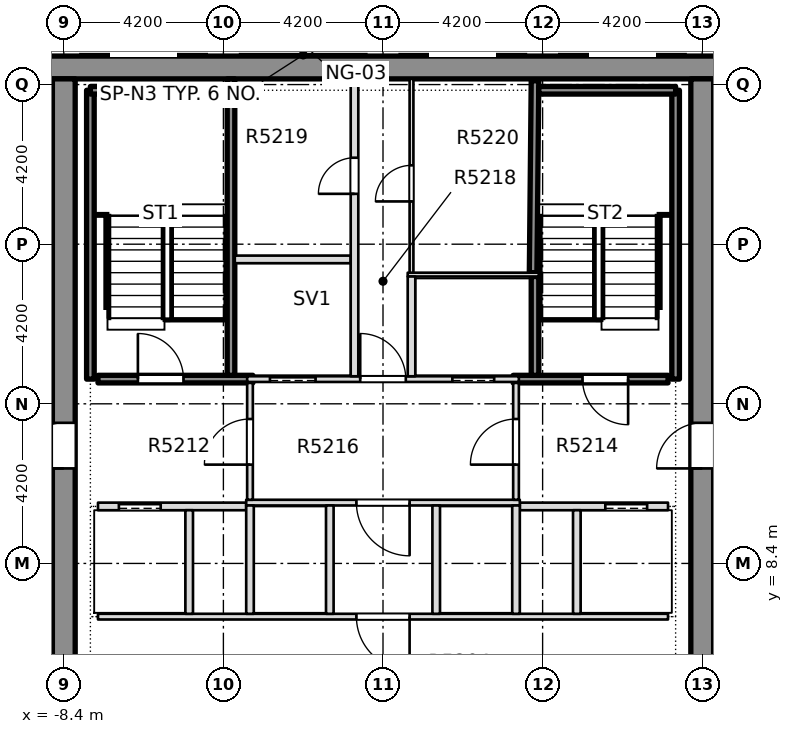
"""IFC4 building model, lengths in metres.
Left out: names, types, materials, properties, quantities, classifications, styles, units other than length and angle.
Written with IfcOpenShell. Run it as: python <this file> out.ifc"""

import sys

from ifc_helpers import new_model, si_unit, direction, frame, frame_2d, origin, place, context, subcontext, project, spatial, rectangle, extrude, element, fill, save


model = new_model("IFC4")
c1 = context("Model", 3, precision=1e-05, world=origin(), true_north=direction((0.0, 1.0)))
c2 = subcontext(c1, "Body", "Model", "MODEL_VIEW")
j1 = project(units=[si_unit("LENGTHUNIT", "METRE"), si_unit("PLANEANGLEUNIT", "RADIAN")], contexts=[c1])
p1 = place(None, origin())
s1 = spatial("IfcSite", under=j1, at=p1, CompositionType="ELEMENT")
p2 = place(p1, origin())
s2 = spatial("IfcBuilding", under=s1, at=p2, CompositionType="ELEMENT")
p3 = place(p2, frame((0.0, 0.0, 199.7)))
s3 = spatial("IfcBuildingStorey", under=s2, at=p3, CompositionType="ELEMENT", Elevation=199.7)
p4 = place(p3, frame((-12.0, 21.45, -0.4), z_axis=(0.0, 0.0, 1.0), x_axis=(1.0, 0.0, 0.0)))
e1 = element("IfcWall", 1, at=p4, inside=s3, PredefinedType="SHEAR", context=c2, shape_type="SweptSolid", body=[
    extrude(rectangle(XDim=24.0, YDim=0.6, at=frame_2d((12.0, 0.0))), origin(), (0.0, 0.0, 1.0), 3.45),
])
p5 = place(p3, frame((-8.4, -7.8, -0.4), z_axis=(0.0, 0.0, 1.0), x_axis=(0.0, 1.0, 0.0)))
e2 = element("IfcWall", 2, at=p5, inside=s3, PredefinedType="SHEAR", context=c2, shape_type="SweptSolid", body=[
    extrude(rectangle(XDim=28.95, YDim=0.6, at=frame_2d((14.475, 0.0))), origin(), (0.0, 0.0, 1.0), 3.45),
])
p6 = place(p5, frame((18.7, 0.0, 0.4)))
e3 = element("IfcOpeningElement", 3, at=p6, cuts=e2, PredefinedType="OPENING", context=c2, shape_type="SweptSolid", body=[
    extrude(rectangle(XDim=1.2, YDim=2.1, at=frame_2d((0.6, 1.05))), frame((0.0, 0.31, 0.0), z_axis=(0.0, -1.0, 0.0), x_axis=(1.0, 0.0, 0.0)), (0.0, 0.0, 1.0), 0.62),
])
p7 = place(p3, frame((8.4, -7.8, -0.4), z_axis=(0.0, 0.0, 1.0), x_axis=(0.0, 1.0, 0.0)))
e4 = element("IfcWall", 4, at=p7, inside=s3, PredefinedType="SHEAR", context=c2, shape_type="SweptSolid", body=[
    extrude(rectangle(XDim=28.95, YDim=0.6, at=frame_2d((14.475, 0.0))), origin(), (0.0, 0.0, 1.0), 3.45),
])
p8 = place(p7, frame((18.7, 0.0, 0.4)))
e5 = element("IfcOpeningElement", 5, at=p8, cuts=e4, PredefinedType="OPENING", context=c2, shape_type="SweptSolid", body=[
    extrude(rectangle(XDim=1.2, YDim=2.1, at=frame_2d((0.6, 1.05))), frame((0.0, 0.31, 0.0), z_axis=(0.0, -1.0, 0.0), x_axis=(1.0, 0.0, 0.0)), (0.0, 0.0, 1.0), 0.62),
])
p9 = place(p3, frame((-7.5, 7.0, 0.0), z_axis=(0.0, 0.0, 1.0), x_axis=(1.0, 0.0, 0.0)))
e6 = element("IfcWall", 6, at=p9, inside=s3, PredefinedType="PARTITIONING", context=c2, shape_type="SweptSolid", body=[
    extrude(rectangle(XDim=15.0, YDim=0.15, at=frame_2d((7.5, 0.0))), origin(), (0.0, 0.0, 1.0), 3.05),
])
p10 = place(p9, frame((6.8, 0.0, 0.0)))
e7 = element("IfcOpeningElement", 7, at=p10, cuts=e6, PredefinedType="OPENING", context=c2, shape_type="SweptSolid", body=[
    extrude(rectangle(XDim=1.4, YDim=2.1, at=frame_2d((0.7, 1.05))), frame((0.0, 0.085, 0.0), z_axis=(0.0, -1.0, 0.0), x_axis=(1.0, 0.0, 0.0)), (0.0, 0.0, 1.0), 0.17),
])
p11 = place(p3, frame((-7.5, 9.9, 0.0), z_axis=(0.0, 0.0, 1.0), x_axis=(1.0, 0.0, 0.0)))
e8 = element("IfcWall", 8, at=p11, inside=s3, PredefinedType="PARTITIONING", context=c2, shape_type="SweptSolid", body=[
    extrude(rectangle(XDim=3.9, YDim=0.2, at=frame_2d((1.95, 0.0))), origin(), (0.0, 0.0, 1.0), 3.05),
])
p12 = place(p11, frame((0.55, 0.0, 0.0)))
e9 = element("IfcOpeningElement", 9, at=p12, cuts=e8, PredefinedType="OPENING", context=c2, shape_type="SweptSolid", body=[
    extrude(rectangle(XDim=1.1, YDim=2.1, at=frame_2d((0.55, 1.05))), frame((0.0, 0.11, 0.0), z_axis=(0.0, -1.0, 0.0), x_axis=(1.0, 0.0, 0.0)), (0.0, 0.0, 1.0), 0.22),
])
p13 = place(p3, frame((3.6, 9.9, 0.0), z_axis=(0.0, 0.0, 1.0), x_axis=(1.0, 0.0, 0.0)))
e10 = element("IfcWall", 10, at=p13, inside=s3, PredefinedType="PARTITIONING", context=c2, shape_type="SweptSolid", body=[
    extrude(rectangle(XDim=3.9, YDim=0.2, at=frame_2d((1.95, 0.0))), origin(), (0.0, 0.0, 1.0), 3.05),
])
p14 = place(p13, frame((2.25, 0.0, 0.0)))
e11 = element("IfcOpeningElement", 11, at=p14, cuts=e10, PredefinedType="OPENING", context=c2, shape_type="SweptSolid", body=[
    extrude(rectangle(XDim=1.1, YDim=2.1, at=frame_2d((0.55, 1.05))), frame((0.0, 0.11, 0.0), z_axis=(0.0, -1.0, 0.0), x_axis=(1.0, 0.0, 0.0)), (0.0, 0.0, 1.0), 0.22),
])
p15 = place(p3, frame((-3.6, 10.0, 0.0), z_axis=(0.0, 0.0, 1.0), x_axis=(1.0, 0.0, 0.0)))
e12 = element("IfcWall", 12, at=p15, inside=s3, PredefinedType="PARTITIONING", context=c2, shape_type="SweptSolid", body=[
    extrude(rectangle(XDim=7.2, YDim=0.15, at=frame_2d((3.6, 0.0))), origin(), (0.0, 0.0, 1.0), 3.05),
])
p16 = place(p15, frame((2.9, 0.0, 0.0)))
e13 = element("IfcOpeningElement", 13, at=p16, cuts=e12, PredefinedType="OPENING", context=c2, shape_type="SweptSolid", body=[
    extrude(rectangle(XDim=1.4, YDim=2.1, at=frame_2d((0.7, 1.05))), frame((0.0, 0.085, 0.0), z_axis=(0.0, -1.0, 0.0), x_axis=(1.0, 0.0, 0.0)), (0.0, 0.0, 1.0), 0.17),
])
p17 = place(p3, frame((-7.5, 13.25, 0.0), z_axis=(0.0, 0.0, 1.0), x_axis=(1.0, 0.0, 0.0)))
e14 = element("IfcWall", 14, at=p17, inside=s3, PredefinedType="SOLIDWALL", context=c2, shape_type="SweptSolid", body=[
    extrude(rectangle(XDim=4.075, YDim=0.2, at=frame_2d((2.038, 0.0))), origin(), (0.0, 0.0, 1.0), 3.05),
])
p18 = place(p17, frame((1.05, 0.0, 0.0)))
e15 = element("IfcOpeningElement", 15, at=p18, cuts=e14, PredefinedType="OPENING", context=c2, shape_type="SweptSolid", body=[
    extrude(rectangle(XDim=1.2, YDim=2.1, at=frame_2d((0.6, 1.05))), frame((0.0, 0.11, 0.0), z_axis=(0.0, -1.0, 0.0), x_axis=(1.0, 0.0, 0.0)), (0.0, 0.0, 1.0), 0.22),
])
p19 = place(p3, frame((-3.575, 13.25, 0.0), z_axis=(0.0, 0.0, 1.0), x_axis=(1.0, 0.0, 0.0)))
e16 = element("IfcWall", 16, at=p19, inside=s3, PredefinedType="PARTITIONING", context=c2, shape_type="SweptSolid", body=[
    extrude(rectangle(XDim=7.15, YDim=0.15, at=frame_2d((3.575, 0.0))), origin(), (0.0, 0.0, 1.0), 3.05),
])
p20 = place(p19, frame((0.6, 0.0, 0.0)))
e17 = element("IfcOpeningElement", 17, at=p20, cuts=e16, PredefinedType="OPENING", context=c2, shape_type="SweptSolid", body=[
    extrude(rectangle(XDim=1.2, YDim=2.1, at=frame_2d((0.6, 1.05))), frame((0.0, 0.085, 0.0), z_axis=(0.0, -1.0, 0.0), x_axis=(1.0, 0.0, 0.0)), (0.0, 0.0, 1.0), 0.17),
])
p21 = place(p19, frame((5.4, 0.0, 0.0)))
e18 = element("IfcOpeningElement", 18, at=p21, cuts=e16, PredefinedType="OPENING", context=c2, shape_type="SweptSolid", body=[
    extrude(rectangle(XDim=1.1, YDim=2.1, at=frame_2d((0.55, 1.05))), frame((0.0, 0.085, 0.0), z_axis=(0.0, -1.0, 0.0), x_axis=(1.0, 0.0, 0.0)), (0.0, 0.0, 1.0), 0.17),
])
p22 = place(p19, frame((2.975, 0.0, 0.0)))
e19 = element("IfcOpeningElement", 19, at=p22, cuts=e16, PredefinedType="OPENING", context=c2, shape_type="SweptSolid", body=[
    extrude(rectangle(XDim=1.2, YDim=2.1, at=frame_2d((0.6, 1.05))), frame((0.0, 0.085, 0.0), z_axis=(0.0, -1.0, 0.0), x_axis=(1.0, 0.0, 0.0)), (0.0, 0.0, 1.0), 0.17),
])
p23 = place(p3, frame((3.425, 13.25, 0.0), z_axis=(0.0, 0.0, 1.0), x_axis=(1.0, 0.0, 0.0)))
e20 = element("IfcWall", 20, at=p23, inside=s3, PredefinedType="SOLIDWALL", context=c2, shape_type="SweptSolid", body=[
    extrude(rectangle(XDim=4.075, YDim=0.2, at=frame_2d((2.038, 0.0))), origin(), (0.0, 0.0, 1.0), 3.05),
])
p24 = place(p23, frame((1.825, 0.0, 0.0)))
e21 = element("IfcOpeningElement", 21, at=p24, cuts=e20, PredefinedType="OPENING", context=c2, shape_type="SweptSolid", body=[
    extrude(rectangle(XDim=1.2, YDim=2.1, at=frame_2d((0.6, 1.05))), frame((0.0, 0.11, 0.0), z_axis=(0.0, -1.0, 0.0), x_axis=(1.0, 0.0, 0.0)), (0.0, 0.0, 1.0), 0.22),
])
p25 = place(p3, frame((0.65, 16.0, 0.0), z_axis=(0.0, 0.0, 1.0), x_axis=(1.0, 0.0, 0.0)))
e22 = element("IfcWall", 22, at=p25, inside=s3, PredefinedType="PARTITIONING", context=c2, shape_type="SweptSolid", body=[
    extrude(rectangle(XDim=3.45, YDim=0.1, at=frame_2d((1.725, 0.0))), origin(), (0.0, 0.0, 1.0), 3.05),
])
p26 = place(p3, frame((-3.9, 16.4, 0.0), z_axis=(0.0, 0.0, 1.0), x_axis=(1.0, 0.0, 0.0)))
e23 = element("IfcWall", 23, at=p26, inside=s3, PredefinedType="PARTITIONING", context=c2, shape_type="SweptSolid", body=[
    extrude(rectangle(XDim=3.05, YDim=0.2, at=frame_2d((1.525, 0.0))), origin(), (0.0, 0.0, 1.0), 3.05),
])
p27 = place(p3, frame((-5.1, 7.075, 0.0), z_axis=(0.0, 0.0, 1.0), x_axis=(0.0, 1.0, 0.0)))
e24 = element("IfcWall", 24, at=p27, inside=s3, PredefinedType="PARTITIONING", context=c2, shape_type="SweptSolid", body=[
    extrude(rectangle(XDim=2.725, YDim=0.2, at=frame_2d((1.363, 0.0))), origin(), (0.0, 0.0, 1.0), 3.05),
])
p28 = place(p3, frame((-4.0, 13.35, 0.0), z_axis=(0.0, 0.0, 1.0), x_axis=(0.0, 1.0, 0.0)))
e25 = element("IfcWall", 25, at=p28, inside=s3, PredefinedType="SOLIDWALL", context=c2, shape_type="SweptSolid", body=[
    extrude(rectangle(XDim=7.799, YDim=0.2, at=frame_2d((3.899, 0.0))), origin(), (0.0, 0.0, 1.0), 3.05),
])
p29 = place(p3, frame((-3.5, 7.075, 0.0), z_axis=(0.0, 0.0, 1.0), x_axis=(0.0, 1.0, 0.0)))
e26 = element("IfcWall", 26, at=p29, inside=s3, PredefinedType="PARTITIONING", context=c2, shape_type="SweptSolid", body=[
    extrude(rectangle(XDim=2.85, YDim=0.2, at=frame_2d((1.425, 0.0))), origin(), (0.0, 0.0, 1.0), 3.05),
])
p30 = place(p3, frame((-3.5, 10.075, 0.0), z_axis=(0.0, 0.0, 1.0), x_axis=(0.0, 1.0, 0.0)))
e27 = element("IfcWall", 27, at=p30, inside=s3, PredefinedType="PARTITIONING", context=c2, shape_type="SweptSolid", body=[
    extrude(rectangle(XDim=3.075, YDim=0.15, at=frame_2d((1.538, 0.0))), origin(), (0.0, 0.0, 1.0), 3.05),
])
p31 = place(p30, frame((0.925, 0.0, 0.0)))
e28 = element("IfcOpeningElement", 28, at=p31, cuts=e27, PredefinedType="OPENING", context=c2, shape_type="SweptSolid", body=[
    extrude(rectangle(XDim=1.2, YDim=2.1, at=frame_2d((0.6, 1.05))), frame((0.0, 0.085, 0.0), z_axis=(0.0, -1.0, 0.0), x_axis=(1.0, 0.0, 0.0)), (0.0, 0.0, 1.0), 0.17),
])
p32 = place(p3, frame((-1.4, 7.075, 0.0), z_axis=(0.0, 0.0, 1.0), x_axis=(0.0, 1.0, 0.0)))
e29 = element("IfcWall", 29, at=p32, inside=s3, PredefinedType="PARTITIONING", context=c2, shape_type="SweptSolid", body=[
    extrude(rectangle(XDim=2.85, YDim=0.2, at=frame_2d((1.425, 0.0))), origin(), (0.0, 0.0, 1.0), 3.05),
])
p33 = place(p3, frame((-0.75, 13.325, 0.0), z_axis=(0.0, 0.0, 1.0), x_axis=(0.0, 1.0, 0.0)))
e30 = element("IfcWall", 30, at=p33, inside=s3, PredefinedType="PARTITIONING", context=c2, shape_type="SweptSolid", body=[
    extrude(rectangle(XDim=7.824, YDim=0.2, at=frame_2d((3.912, 0.0))), origin(), (0.0, 0.0, 1.0), 3.05),
])
p34 = place(p33, frame((4.8, 0.0, 0.0)))
e31 = element("IfcOpeningElement", 31, at=p34, cuts=e30, PredefinedType="OPENING", context=c2, shape_type="SweptSolid", body=[
    extrude(rectangle(XDim=0.95, YDim=2.1, at=frame_2d((0.475, 1.05))), frame((0.0, 0.11, 0.0), z_axis=(0.0, -1.0, 0.0), x_axis=(1.0, 0.0, 0.0)), (0.0, 0.0, 1.0), 0.22),
])
p35 = place(p3, frame((0.75, 13.325, 0.0), z_axis=(0.0, 0.0, 1.0), x_axis=(0.0, 1.0, 0.0)))
e32 = element("IfcWall", 32, at=p35, inside=s3, PredefinedType="PARTITIONING", context=c2, shape_type="SweptSolid", body=[
    extrude(rectangle(XDim=2.625, YDim=0.2, at=frame_2d((1.312, 0.0))), origin(), (0.0, 0.0, 1.0), 3.05),
])
p36 = place(p3, frame((0.75, 16.05, 0.0), z_axis=(0.0, 0.0, 1.0), x_axis=(0.0, 1.0, 0.0)))
e33 = element("IfcWall", 33, at=p36, inside=s3, PredefinedType="PARTITIONING", context=c2, shape_type="SweptSolid", body=[
    extrude(rectangle(XDim=5.099, YDim=0.1, at=frame_2d((2.549, 0.0))), origin(), (0.0, 0.0, 1.0), 3.05),
])
p37 = place(p36, frame((1.875, 0.0, 0.0)))
e34 = element("IfcOpeningElement", 34, at=p37, cuts=e33, PredefinedType="OPENING", context=c2, shape_type="SweptSolid", body=[
    extrude(rectangle(XDim=0.95, YDim=2.1, at=frame_2d((0.475, 1.05))), frame((0.0, 0.06, 0.0), z_axis=(0.0, -1.0, 0.0), x_axis=(1.0, 0.0, 0.0)), (0.0, 0.0, 1.0), 0.12),
])
for number, where, z_axis, x_axis in (
    (35, (1.4, 7.075, 0.0), (0.0, 0.0, 1.0), (0.0, 1.0, 0.0)),
    (36, (3.5, 7.075, 0.0), (0.0, 0.0, 1.0), (0.0, 1.0, 0.0)),
):
    element("IfcWall", number, at=place(p3, frame(where, z_axis=z_axis, x_axis=x_axis)), inside=s3, PredefinedType="PARTITIONING", context=c2, shape_type="SweptSolid", body=[
        extrude(rectangle(XDim=2.85, YDim=0.2, at=frame_2d((1.425, 0.0))), origin(), (0.0, 0.0, 1.0), 3.05),
    ])
p38 = place(p3, frame((3.5, 10.075, 0.0), z_axis=(0.0, 0.0, 1.0), x_axis=(0.0, 1.0, 0.0)))
e37 = element("IfcWall", 37, at=p38, inside=s3, PredefinedType="PARTITIONING", context=c2, shape_type="SweptSolid", body=[
    extrude(rectangle(XDim=3.075, YDim=0.15, at=frame_2d((1.538, 0.0))), origin(), (0.0, 0.0, 1.0), 3.05),
])
p39 = place(p38, frame((0.925, 0.0, 0.0)))
e38 = element("IfcOpeningElement", 38, at=p39, cuts=e37, PredefinedType="OPENING", context=c2, shape_type="SweptSolid", body=[
    extrude(rectangle(XDim=1.2, YDim=2.1, at=frame_2d((0.6, 1.05))), frame((0.0, 0.085, 0.0), z_axis=(0.0, -1.0, 0.0), x_axis=(1.0, 0.0, 0.0)), (0.0, 0.0, 1.0), 0.17),
])
p40 = place(p3, frame((4.0, 13.35, 0.0), z_axis=(0.0, 0.0, 1.0), x_axis=(0.0, 1.0, 0.0)))
e39 = element("IfcWall", 39, at=p40, inside=s3, PredefinedType="SOLIDWALL", context=c2, shape_type="SweptSolid", body=[
    extrude(rectangle(XDim=2.6, YDim=0.2, at=frame_2d((1.3, 0.0))), origin(), (0.0, 0.0, 1.0), 3.05),
])
p41 = place(p3, frame((3.95, 16.05, 0.0), z_axis=(0.0, 0.0, 1.0), x_axis=(0.009911993103, 0.99995087499, 0.0)))
e40 = element("IfcWall", 40, at=p41, inside=s3, PredefinedType="SOLIDWALL", context=c2, shape_type="SweptSolid", body=[
    extrude(rectangle(XDim=5.049, YDim=0.2, at=frame_2d((2.525, 0.0))), origin(), (0.0, 0.0, 1.0), 3.05),
])
p42 = place(p3, frame((5.1, 7.075, 0.0), z_axis=(0.0, 0.0, 1.0), x_axis=(0.0, 1.0, 0.0)))
e41 = element("IfcWall", 41, at=p42, inside=s3, PredefinedType="PARTITIONING", context=c2, shape_type="SweptSolid", body=[
    extrude(rectangle(XDim=2.725, YDim=0.2, at=frame_2d((1.363, 0.0))), origin(), (0.0, 0.0, 1.0), 3.05),
])
p43 = place(p3, frame((-7.7, 13.25, 0.0), z_axis=(0.0, 0.0, 1.0), x_axis=(0.0, 1.0, 0.0)))
e42 = element("IfcWall", 42, at=p43, inside=s3, PredefinedType="SOLIDWALL", context=c2, shape_type="SweptSolid", body=[
    extrude(rectangle(XDim=7.6, YDim=0.2, at=frame_2d((3.8, 0.0))), origin(), (0.0, 0.0, 1.0), 3.05),
])
p44 = place(p3, frame((-7.7, 20.85, 0.0), z_axis=(0.0, 0.0, 1.0), x_axis=(1.0, 0.0, 0.0)))
e43 = element("IfcWall", 43, at=p44, inside=s3, PredefinedType="SOLIDWALL", context=c2, shape_type="SweptSolid", body=[
    extrude(rectangle(XDim=3.55, YDim=0.2, at=frame_2d((1.775, 0.0))), origin(), (0.0, 0.0, 1.0), 3.05),
])
p45 = place(p3, frame((7.7, 13.25, 0.0), z_axis=(0.0, 0.0, 1.0), x_axis=(0.0, 1.0, 0.0)))
e44 = element("IfcWall", 44, at=p45, inside=s3, PredefinedType="SOLIDWALL", context=c2, shape_type="SweptSolid", body=[
    extrude(rectangle(XDim=7.6, YDim=0.2, at=frame_2d((3.8, 0.0))), origin(), (0.0, 0.0, 1.0), 3.05),
])
p46 = place(p3, frame((4.1, 20.85, 0.0), z_axis=(0.0, 0.0, 1.0), x_axis=(1.0, 0.0, 0.0)))
e45 = element("IfcWall", 45, at=p46, inside=s3, PredefinedType="SOLIDWALL", context=c2, shape_type="SweptSolid", body=[
    extrude(rectangle(XDim=3.6, YDim=0.2, at=frame_2d((1.8, 0.0))), origin(), (0.0, 0.0, 1.0), 3.05),
])
p47 = place(p18, origin())
e46 = element("IfcDoor", 46, at=p47, inside=s3, OperationType="SINGLE_SWING_LEFT", PredefinedType="DOOR", context=c2, shape_type="SweptSolid", body=[
    extrude(rectangle(XDim=1.2, YDim=2.1, at=frame_2d((0.6, 1.05))), frame((0.0, 0.025, 0.0), z_axis=(0.0, -1.0, 0.0), x_axis=(1.0, 0.0, 0.0)), (0.0, 0.0, 1.0), 0.05),
])
fill(e15, e46)
p48 = place(p12, origin())
e47 = element("IfcDoor", 47, at=p48, inside=s3, OperationType="SLIDING_TO_RIGHT", PredefinedType="DOOR", context=c2, shape_type="SweptSolid", body=[
    extrude(rectangle(XDim=1.1, YDim=2.1, at=frame_2d((0.55, 1.05))), frame((0.0, 0.025, 0.0), z_axis=(0.0, -1.0, 0.0), x_axis=(1.0, 0.0, 0.0)), (0.0, 0.0, 1.0), 0.05),
])
fill(e9, e47)
p49 = place(p24, origin())
e48 = element("IfcDoor", 48, at=p49, inside=s3, OperationType="SINGLE_SWING_RIGHT", PredefinedType="DOOR", context=c2, shape_type="SweptSolid", body=[
    extrude(rectangle(XDim=1.2, YDim=2.1, at=frame_2d((0.6, 1.05))), frame((0.0, 0.025, 0.0), z_axis=(0.0, -1.0, 0.0), x_axis=(1.0, 0.0, 0.0)), (0.0, 0.0, 1.0), 0.05),
])
fill(e21, e48)
p50 = place(p14, origin())
e49 = element("IfcDoor", 49, at=p50, inside=s3, OperationType="SLIDING_TO_LEFT", PredefinedType="DOOR", context=c2, shape_type="SweptSolid", body=[
    extrude(rectangle(XDim=1.1, YDim=2.1, at=frame_2d((0.55, 1.05))), frame((0.0, 0.025, 0.0), z_axis=(0.0, -1.0, 0.0), x_axis=(1.0, 0.0, 0.0)), (0.0, 0.0, 1.0), 0.05),
])
fill(e11, e49)
p51 = place(p10, origin())
e50 = element("IfcDoor", 50, at=p51, inside=s3, OperationType="SINGLE_SWING_RIGHT", PredefinedType="DOOR", context=c2, shape_type="SweptSolid", body=[
    extrude(rectangle(XDim=1.4, YDim=2.1, at=frame_2d((0.7, 1.05))), frame((0.0, 0.025, 0.0), z_axis=(0.0, -1.0, 0.0), x_axis=(1.0, 0.0, 0.0)), (0.0, 0.0, 1.0), 0.05),
])
fill(e7, e50)
p52 = place(p16, origin())
e51 = element("IfcDoor", 51, at=p52, inside=s3, OperationType="SINGLE_SWING_RIGHT", PredefinedType="DOOR", context=c2, shape_type="SweptSolid", body=[
    extrude(rectangle(XDim=1.4, YDim=2.1, at=frame_2d((0.7, 1.05))), frame((0.0, 0.025, 0.0), z_axis=(0.0, -1.0, 0.0), x_axis=(1.0, 0.0, 0.0)), (0.0, 0.0, 1.0), 0.05),
])
fill(e13, e51)
p53 = place(p20, origin())
e52 = element("IfcDoor", 52, at=p53, inside=s3, OperationType="SLIDING_TO_RIGHT", PredefinedType="DOOR", context=c2, shape_type="SweptSolid", body=[
    extrude(rectangle(XDim=1.2, YDim=2.1, at=frame_2d((0.6, 1.05))), frame((0.0, 0.025, 0.0), z_axis=(0.0, -1.0, 0.0), x_axis=(1.0, 0.0, 0.0)), (0.0, 0.0, 1.0), 0.05),
])
fill(e17, e52)
p54 = place(p21, origin())
e53 = element("IfcDoor", 53, at=p54, inside=s3, OperationType="SLIDING_TO_LEFT", PredefinedType="DOOR", context=c2, shape_type="SweptSolid", body=[
    extrude(rectangle(XDim=1.1, YDim=2.1, at=frame_2d((0.55, 1.05))), frame((0.0, 0.025, 0.0), z_axis=(0.0, -1.0, 0.0), x_axis=(1.0, 0.0, 0.0)), (0.0, 0.0, 1.0), 0.05),
])
fill(e18, e53)
p55 = place(p22, origin())
e54 = element("IfcDoor", 54, at=p55, inside=s3, OperationType="SINGLE_SWING_RIGHT", PredefinedType="DOOR", context=c2, shape_type="SweptSolid", body=[
    extrude(rectangle(XDim=1.2, YDim=2.1, at=frame_2d((0.6, 1.05))), frame((0.0, 0.025, 0.0), z_axis=(0.0, -1.0, 0.0), x_axis=(1.0, 0.0, 0.0)), (0.0, 0.0, 1.0), 0.05),
])
fill(e19, e54)
p56 = place(p34, origin())
e55 = element("IfcDoor", 55, at=p56, inside=s3, OperationType="SINGLE_SWING_RIGHT", PredefinedType="DOOR", context=c2, shape_type="SweptSolid", body=[
    extrude(rectangle(XDim=0.95, YDim=2.1, at=frame_2d((0.475, 1.05))), frame((0.0, 0.025, 0.0), z_axis=(0.0, -1.0, 0.0), x_axis=(1.0, 0.0, 0.0)), (0.0, 0.0, 1.0), 0.05),
])
fill(e31, e55)
p57 = place(p37, origin())
e56 = element("IfcDoor", 56, at=p57, inside=s3, OperationType="SINGLE_SWING_LEFT", PredefinedType="DOOR", context=c2, shape_type="SweptSolid", body=[
    extrude(rectangle(XDim=0.95, YDim=2.1, at=frame_2d((0.475, 1.05))), frame((0.0, 0.025, 0.0), z_axis=(0.0, -1.0, 0.0), x_axis=(1.0, 0.0, 0.0)), (0.0, 0.0, 1.0), 0.05),
])
fill(e34, e56)
p58 = place(p31, origin())
e57 = element("IfcDoor", 57, at=p58, inside=s3, OperationType="SINGLE_SWING_RIGHT", PredefinedType="DOOR", context=c2, shape_type="SweptSolid", body=[
    extrude(rectangle(XDim=1.2, YDim=2.1, at=frame_2d((0.6, 1.05))), frame((0.0, 0.025, 0.0), z_axis=(0.0, -1.0, 0.0), x_axis=(1.0, 0.0, 0.0)), (0.0, 0.0, 1.0), 0.05),
])
fill(e28, e57)
p59 = place(p39, origin())
e58 = element("IfcDoor", 58, at=p59, inside=s3, OperationType="SINGLE_SWING_LEFT", PredefinedType="DOOR", context=c2, shape_type="SweptSolid", body=[
    extrude(rectangle(XDim=1.2, YDim=2.1, at=frame_2d((0.6, 1.05))), frame((0.0, 0.025, 0.0), z_axis=(0.0, -1.0, 0.0), x_axis=(1.0, 0.0, 0.0)), (0.0, 0.0, 1.0), 0.05),
])
fill(e38, e58)
p60 = place(p6, origin())
e59 = element("IfcDoor", 59, at=p60, inside=s3, OperationType="SINGLE_SWING_LEFT", PredefinedType="DOOR", context=c2, shape_type="SweptSolid", body=[
    extrude(rectangle(XDim=1.2, YDim=2.1, at=frame_2d((0.6, 1.05))), frame((0.0, 0.025, 0.0), z_axis=(0.0, -1.0, 0.0), x_axis=(1.0, 0.0, 0.0)), (0.0, 0.0, 1.0), 0.05),
])
fill(e3, e59)
p61 = place(p8, origin())
e60 = element("IfcDoor", 60, at=p61, inside=s3, OperationType="SINGLE_SWING_LEFT", PredefinedType="DOOR", context=c2, shape_type="SweptSolid", body=[
    extrude(rectangle(XDim=1.2, YDim=2.1, at=frame_2d((0.6, 1.05))), frame((0.0, 0.025, 0.0), z_axis=(0.0, -1.0, 0.0), x_axis=(1.0, 0.0, 0.0)), (0.0, 0.0, 1.0), 0.05),
])
fill(e5, e60)
save(model, sys.argv[1])
